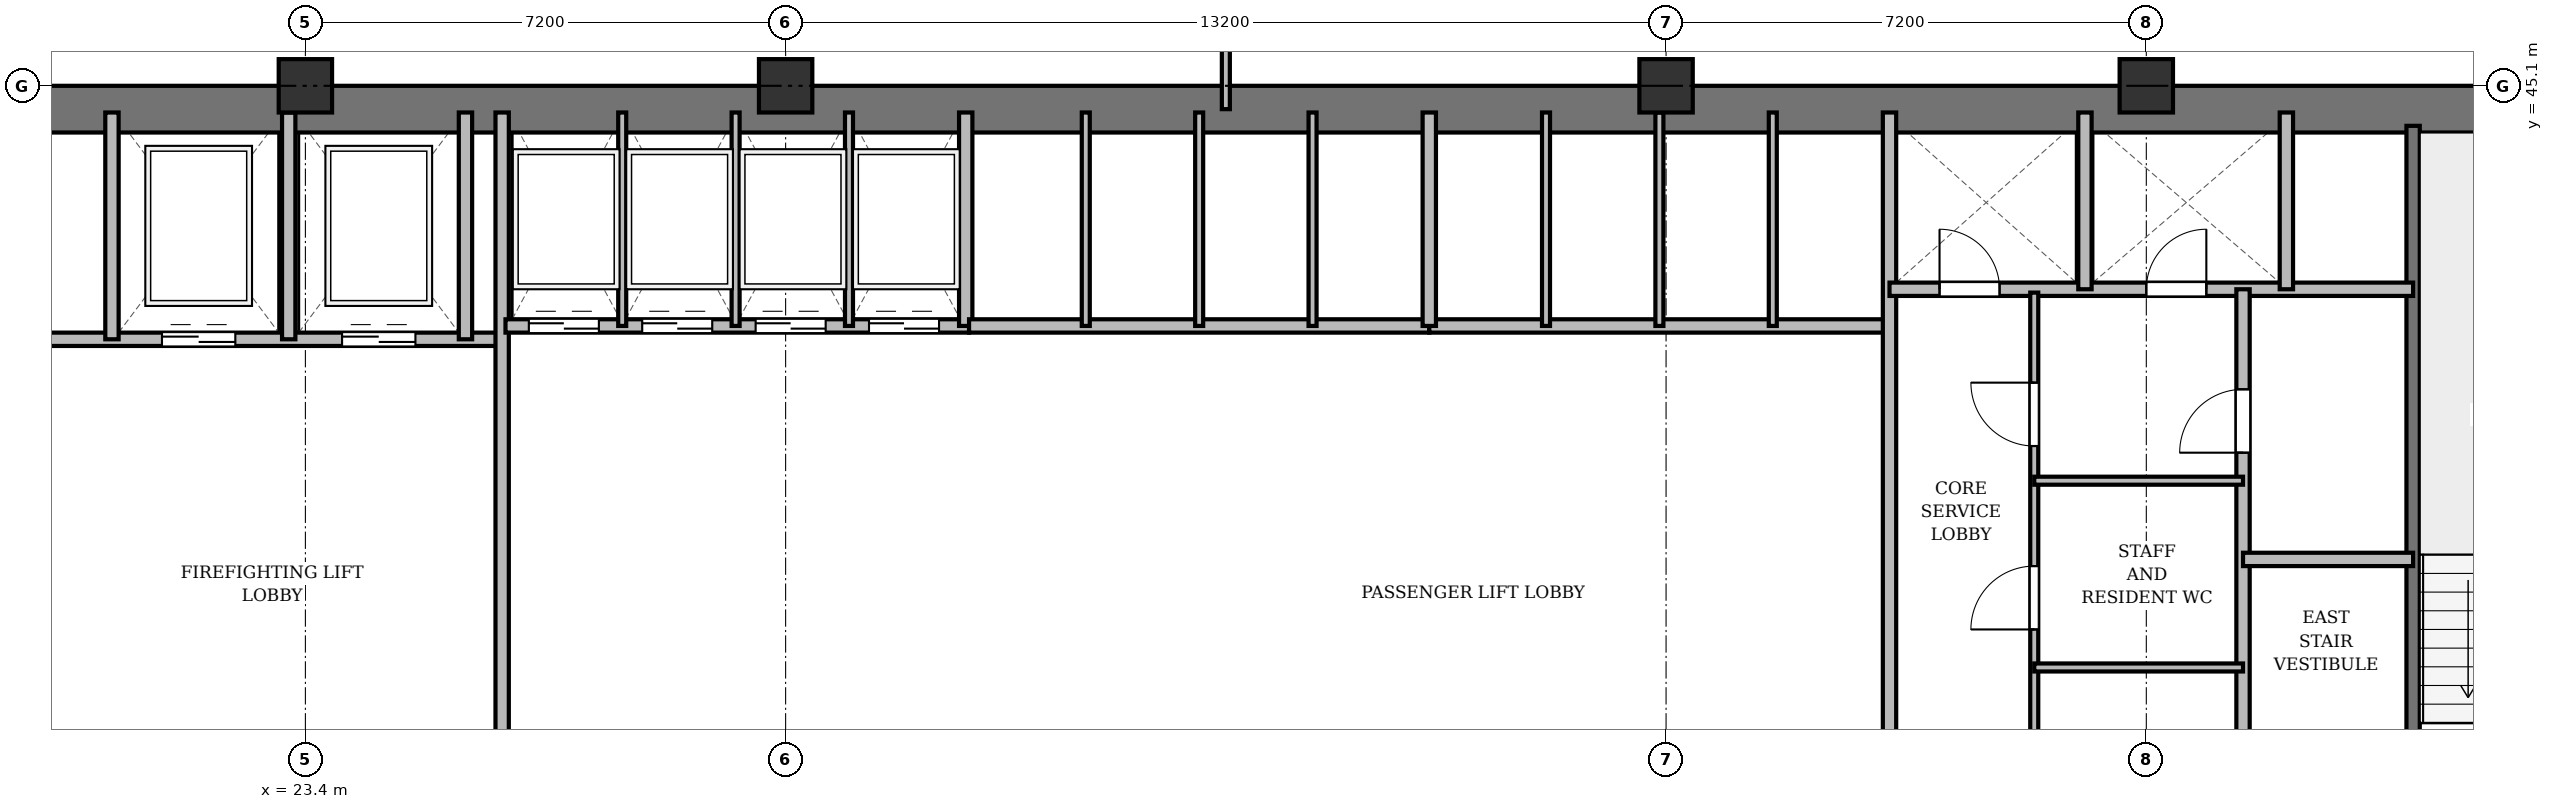
"""IFC4 building model, lengths in metres.
Left out: names, types, materials, properties, quantities, classifications, styles, units other than length and angle.
Written with IfcOpenShell. Run it as: python <this file> out.ifc"""

import sys

from ifc_helpers import new_model, si_unit, direction, frame, frame_2d, origin, origin_2d, place, context, subcontext, project, spatial, rectangle, extrude, source, transform, mapped, element, fill, save


model = new_model("IFC4")
c1 = context("Model", 3, precision=1e-05, world=origin(), true_north=direction((0.0, 1.0)))
c2 = subcontext(c1, "Body", "Model", "MODEL_VIEW")
j1 = project(units=[si_unit("LENGTHUNIT", "METRE"), si_unit("PLANEANGLEUNIT", "RADIAN")], contexts=[c1])
p1 = place(None, origin())
s1 = spatial("IfcSite", under=j1, at=p1, CompositionType="ELEMENT")
p2 = place(p1, origin())
s2 = spatial("IfcBuilding", under=s1, at=p2, CompositionType="ELEMENT")
p3 = place(p2, frame((0.0, 0.0, 96.1)))
s3 = spatial("IfcBuildingStorey", under=s2, at=p3, CompositionType="ELEMENT", Elevation=96.1)
m1 = source(origin(), c2, "Body", "SweptSolid", [
    extrude(rectangle(XDim=0.8, YDim=0.8, at=origin_2d()), origin(), (0.0, 0.0, 1.0), 3.6),
])
for number, where, z_axis, x_axis in (
    (1, (23.4, 45.1, 0.0), (0.0, 0.0, 1.0), (1.0, 0.0, 0.0)),
    (2, (30.6, 45.1, 0.0), (0.0, 0.0, 1.0), (1.0, 0.0, 0.0)),
    (3, (43.8, 45.1, 0.0), (0.0, 0.0, 1.0), (1.0, 0.0, 0.0)),
    (4, (51.0, 45.1, 0.0), (0.0, 0.0, 1.0), (1.0, 0.0, 0.0)),
):
    element("IfcColumn", number, at=place(p3, frame(where, z_axis=z_axis, x_axis=x_axis)), inside=s3, PredefinedType="COLUMN", context=c2, shape_type="MappedRepresentation", body=[
        mapped(m1, transform((0.0, 0.0, 0.0), x_axis=(1.0, 0.0, 0.0), y_axis=(0.0, 1.0, 0.0), z_axis=(0.0, 0.0, 1.0), scale=1.0)),
    ])
p4 = place(p3, frame((15.5, 44.75, 0.0), z_axis=(0.0, 0.0, 1.0), x_axis=(1.0, 0.0, 0.0)))
e5 = element("IfcWall", 5, at=p4, inside=s3, PredefinedType="SHEAR", context=c2, shape_type="SweptSolid", body=[
    extrude(rectangle(XDim=43.4, YDim=0.7, at=frame_2d((21.7, 0.0))), origin(), (0.0, 0.0, 1.0), 3.34),
])
p5 = place(p3, frame((55.0, 33.4, 0.0), z_axis=(0.0, 0.0, 1.0), x_axis=(0.0, 1.0, 0.0)))
e6 = element("IfcWall", 6, at=p5, inside=s3, PredefinedType="SHEAR", context=c2, shape_type="SweptSolid", body=[
    extrude(rectangle(XDim=11.1, YDim=0.2, at=frame_2d((5.55, 0.0))), origin(), (0.0, 0.0, 1.0), 3.34),
])
p6 = place(p5, frame((0.85, 0.0, 0.0)))
e7 = element("IfcOpeningElement", 7, at=p6, cuts=e6, PredefinedType="OPENING", context=c2, shape_type="SweptSolid", body=[
    extrude(rectangle(XDim=1.1, YDim=2.15, at=frame_2d((0.55, 1.075))), frame((0.0, 0.11, 0.0), z_axis=(0.0, -1.0, 0.0), x_axis=(1.0, 0.0, 0.0)), (0.0, 0.0, 1.0), 0.22),
])
p7 = place(p3, frame((19.55, 41.3, 0.0), z_axis=(0.0, 0.0, 1.0), x_axis=(1.0, 0.0, 0.0)))
e8 = element("IfcWall", 8, at=p7, inside=s3, PredefinedType="SOLIDWALL", context=c2, shape_type="SweptSolid", body=[
    extrude(rectangle(XDim=6.75, YDim=0.2, at=frame_2d((3.375, 0.0))), origin(), (0.0, 0.0, 1.0), 3.34),
])
p8 = place(p7, frame((1.7, 0.0, 0.0)))
e9 = element("IfcOpeningElement", 9, at=p8, cuts=e8, PredefinedType="OPENING", context=c2, shape_type="SweptSolid", body=[
    extrude(rectangle(XDim=1.1, YDim=2.15, at=frame_2d((0.55, 1.075))), frame((0.0, 0.11, 0.0), z_axis=(0.0, -1.0, 0.0), x_axis=(1.0, 0.0, 0.0)), (0.0, 0.0, 1.0), 0.22),
])
p9 = place(p7, frame((4.4, 0.0, 0.0)))
e10 = element("IfcOpeningElement", 10, at=p9, cuts=e8, PredefinedType="OPENING", context=c2, shape_type="SweptSolid", body=[
    extrude(rectangle(XDim=1.1, YDim=2.15, at=frame_2d((0.55, 1.075))), frame((0.0, 0.11, 0.0), z_axis=(0.0, -1.0, 0.0), x_axis=(1.0, 0.0, 0.0)), (0.0, 0.0, 1.0), 0.22),
])
for number, where, z_axis, x_axis in (
    (11, (20.5, 41.3, 0.0), (0.0, 0.0, 1.0), (0.0, 1.0, 0.0)),
    (12, (23.15, 41.3, 0.0), (0.0, 0.0, 1.0), (0.0, 1.0, 0.0)),
    (13, (25.8, 41.3, 0.0), (0.0, 0.0, 1.0), (0.0, 1.0, 0.0)),
):
    element("IfcWall", number, at=place(p3, frame(where, z_axis=z_axis, x_axis=x_axis)), inside=s3, PredefinedType="SOLIDWALL", context=c2, shape_type="SweptSolid", body=[
        extrude(rectangle(XDim=3.4, YDim=0.2, at=frame_2d((1.7, 0.0))), origin(), (0.0, 0.0, 1.0), 3.34),
    ])
p10 = place(p3, frame((26.35, 33.4, 0.0), z_axis=(0.0, 0.0, 1.0), x_axis=(0.0, 1.0, 0.0)))
e14 = element("IfcWall", 14, at=p10, inside=s3, PredefinedType="SOLIDWALL", context=c2, shape_type="SweptSolid", body=[
    extrude(rectangle(XDim=11.3, YDim=0.2, at=frame_2d((5.65, 0.0))), origin(), (0.0, 0.0, 1.0), 2.752),
])
p11 = place(p3, frame((26.4, 41.5, 0.0), z_axis=(0.0, 0.0, 1.0), x_axis=(1.0, 0.0, 0.0)))
e15 = element("IfcWall", 15, at=p11, inside=s3, PredefinedType="SOLIDWALL", context=c2, shape_type="SweptSolid", body=[
    extrude(rectangle(XDim=6.95, YDim=0.2, at=frame_2d((3.475, 0.0))), origin(), (0.0, 0.0, 1.0), 3.34),
])
p12 = place(p11, frame((0.35, 0.0, 0.0)))
e16 = element("IfcOpeningElement", 16, at=p12, cuts=e15, PredefinedType="OPENING", context=c2, shape_type="SweptSolid", body=[
    extrude(rectangle(XDim=1.05, YDim=2.15, at=frame_2d((0.525, 1.075))), frame((0.0, 0.11, 0.0), z_axis=(0.0, -1.0, 0.0), x_axis=(1.0, 0.0, 0.0)), (0.0, 0.0, 1.0), 0.22),
])
p13 = place(p11, frame((2.05, 0.0, 0.0)))
e17 = element("IfcOpeningElement", 17, at=p13, cuts=e15, PredefinedType="OPENING", context=c2, shape_type="SweptSolid", body=[
    extrude(rectangle(XDim=1.05, YDim=2.15, at=frame_2d((0.525, 1.075))), frame((0.0, 0.11, 0.0), z_axis=(0.0, -1.0, 0.0), x_axis=(1.0, 0.0, 0.0)), (0.0, 0.0, 1.0), 0.22),
])
p14 = place(p11, frame((3.75, 0.0, 0.0)))
e18 = element("IfcOpeningElement", 18, at=p14, cuts=e15, PredefinedType="OPENING", context=c2, shape_type="SweptSolid", body=[
    extrude(rectangle(XDim=1.05, YDim=2.15, at=frame_2d((0.525, 1.075))), frame((0.0, 0.11, 0.0), z_axis=(0.0, -1.0, 0.0), x_axis=(1.0, 0.0, 0.0)), (0.0, 0.0, 1.0), 0.22),
])
p15 = place(p11, frame((5.45, 0.0, 0.0)))
e19 = element("IfcOpeningElement", 19, at=p15, cuts=e15, PredefinedType="OPENING", context=c2, shape_type="SweptSolid", body=[
    extrude(rectangle(XDim=1.05, YDim=2.15, at=frame_2d((0.525, 1.075))), frame((0.0, 0.11, 0.0), z_axis=(0.0, -1.0, 0.0), x_axis=(1.0, 0.0, 0.0)), (0.0, 0.0, 1.0), 0.22),
])
p16 = place(p3, frame((33.3, 41.5, 0.0), z_axis=(0.0, 0.0, 1.0), x_axis=(0.0, 1.0, 0.0)))
e20 = element("IfcWall", 20, at=p16, inside=s3, PredefinedType="SOLIDWALL", context=c2, shape_type="SweptSolid", body=[
    extrude(rectangle(XDim=3.2, YDim=0.2, at=frame_2d((1.6, 0.0))), origin(), (0.0, 0.0, 1.0), 3.34),
])
for number, where, z_axis, x_axis in (
    (21, (28.15, 41.5, 0.0), (0.0, 0.0, 1.0), (0.0, 1.0, 0.0)),
    (22, (29.85, 41.5, 0.0), (0.0, 0.0, 1.0), (0.0, 1.0, 0.0)),
    (23, (31.55, 41.5, 0.0), (0.0, 0.0, 1.0), (0.0, 1.0, 0.0)),
):
    element("IfcWall", number, at=place(p3, frame(where, z_axis=z_axis, x_axis=x_axis)), inside=s3, PredefinedType="PARTITIONING", context=c2, shape_type="SweptSolid", body=[
        extrude(rectangle(XDim=3.2, YDim=0.12, at=frame_2d((1.6, 0.0))), origin(), (0.0, 0.0, 1.0), 3.34),
    ])
p17 = place(p3, frame((33.35, 41.5, 0.0), z_axis=(0.0, 0.0, 1.0), x_axis=(1.0, 0.0, 0.0)))
e24 = element("IfcWall", 24, at=p17, inside=s3, PredefinedType="SOLIDWALL", context=c2, shape_type="SweptSolid", body=[
    extrude(rectangle(XDim=6.9, YDim=0.2, at=frame_2d((3.45, 0.0))), origin(), (0.0, 0.0, 1.0), 3.34),
])
for number, where, z_axis, x_axis in (
    (25, (35.1, 41.5, 0.0), (0.0, 0.0, 1.0), (0.0, 1.0, 0.0)),
    (26, (36.8, 41.5, 0.0), (0.0, 0.0, 1.0), (0.0, 1.0, 0.0)),
    (27, (38.5, 41.5, 0.0), (0.0, 0.0, 1.0), (0.0, 1.0, 0.0)),
):
    element("IfcWall", number, at=place(p3, frame(where, z_axis=z_axis, x_axis=x_axis)), inside=s3, PredefinedType="PARTITIONING", context=c2, shape_type="SweptSolid", body=[
        extrude(rectangle(XDim=3.2, YDim=0.12, at=frame_2d((1.6, 0.0))), origin(), (0.0, 0.0, 1.0), 3.34),
    ])
p18 = place(p3, frame((40.25, 41.5, 0.0), z_axis=(0.0, 0.0, 1.0), x_axis=(1.0, 0.0, 0.0)))
e28 = element("IfcWall", 28, at=p18, inside=s3, PredefinedType="SOLIDWALL", context=c2, shape_type="SweptSolid", body=[
    extrude(rectangle(XDim=6.9, YDim=0.2, at=frame_2d((3.45, 0.0))), origin(), (0.0, 0.0, 1.0), 2.84),
])
p19 = place(p3, frame((40.25, 41.5, 0.0), z_axis=(0.0, 0.0, 1.0), x_axis=(0.0, 1.0, 0.0)))
e29 = element("IfcWall", 29, at=p19, inside=s3, PredefinedType="SOLIDWALL", context=c2, shape_type="SweptSolid", body=[
    extrude(rectangle(XDim=3.2, YDim=0.2, at=frame_2d((1.6, 0.0))), origin(), (0.0, 0.0, 1.0), 3.34),
])
p20 = place(p3, frame((42.0, 41.5, 0.0), z_axis=(0.0, 0.0, 1.0), x_axis=(0.0, 1.0, 0.0)))
e30 = element("IfcWall", 30, at=p20, inside=s3, PredefinedType="PARTITIONING", context=c2, shape_type="SweptSolid", body=[
    extrude(rectangle(XDim=3.2, YDim=0.12, at=frame_2d((1.6, 0.0))), origin(), (0.0, 0.0, 1.0), 3.34),
])
p21 = place(p3, frame((43.7, 41.5, 0.0), z_axis=(0.0, 0.0, 1.0), x_axis=(0.0, 1.0, 0.0)))
e31 = element("IfcWall", 31, at=p21, inside=s3, PredefinedType="PARTITIONING", context=c2, shape_type="SweptSolid", body=[
    extrude(rectangle(XDim=3.2, YDim=0.12, at=frame_2d((1.6, 0.0))), origin(), (0.0, 0.0, 1.0), 2.84),
])
p22 = place(p3, frame((45.4, 41.5, 0.0), z_axis=(0.0, 0.0, 1.0), x_axis=(0.0, 1.0, 0.0)))
e32 = element("IfcWall", 32, at=p22, inside=s3, PredefinedType="PARTITIONING", context=c2, shape_type="SweptSolid", body=[
    extrude(rectangle(XDim=3.2, YDim=0.12, at=frame_2d((1.6, 0.0))), origin(), (0.0, 0.0, 1.0), 3.34),
])
p23 = place(p3, frame((47.15, 33.4, 0.0), z_axis=(0.0, 0.0, 1.0), x_axis=(0.0, 1.0, 0.0)))
e33 = element("IfcWall", 33, at=p23, inside=s3, PredefinedType="SOLIDWALL", context=c2, shape_type="SweptSolid", body=[
    extrude(rectangle(XDim=11.3, YDim=0.2, at=frame_2d((5.65, 0.0))), origin(), (0.0, 0.0, 1.0), 2.752),
])
p24 = place(p3, frame((47.15, 42.05, 0.0), z_axis=(0.0, 0.0, 1.0), x_axis=(1.0, 0.0, 0.0)))
e34 = element("IfcWall", 34, at=p24, inside=s3, PredefinedType="SOLIDWALL", context=c2, shape_type="SweptSolid", body=[
    extrude(rectangle(XDim=7.85, YDim=0.2, at=frame_2d((3.925, 0.0))), origin(), (0.0, 0.0, 1.0), 2.84),
])
p25 = place(p24, frame((0.75, 0.0, 0.0)))
e35 = element("IfcOpeningElement", 35, at=p25, cuts=e34, PredefinedType="OPENING", context=c2, shape_type="SweptSolid", body=[
    extrude(rectangle(XDim=0.9, YDim=2.1, at=frame_2d((0.45, 1.05))), frame((0.0, 0.11, 0.0), z_axis=(0.0, -1.0, 0.0), x_axis=(1.0, 0.0, 0.0)), (0.0, 0.0, 1.0), 0.22),
])
p26 = place(p24, frame((3.85, 0.0, 0.0)))
e36 = element("IfcOpeningElement", 36, at=p26, cuts=e34, PredefinedType="OPENING", context=c2, shape_type="SweptSolid", body=[
    extrude(rectangle(XDim=0.9, YDim=2.1, at=frame_2d((0.45, 1.05))), frame((0.0, 0.11, 0.0), z_axis=(0.0, -1.0, 0.0), x_axis=(1.0, 0.0, 0.0)), (0.0, 0.0, 1.0), 0.22),
])
for number, where, z_axis, x_axis in (
    (37, (50.08, 42.05, 0.0), (0.0, 0.0, 1.0), (0.0, 1.0, 0.0)),
    (38, (53.1, 42.05, 0.0), (0.0, 0.0, 1.0), (0.0, 1.0, 0.0)),
):
    element("IfcWall", number, at=place(p3, frame(where, z_axis=z_axis, x_axis=x_axis)), inside=s3, PredefinedType="SOLIDWALL", context=c2, shape_type="SweptSolid", body=[
        extrude(rectangle(XDim=2.65, YDim=0.2, at=frame_2d((1.325, 0.0))), origin(), (0.0, 0.0, 1.0), 3.34),
    ])
p27 = place(p3, frame((52.45, 33.4, 0.0), z_axis=(0.0, 0.0, 1.0), x_axis=(0.0, 1.0, 0.0)))
e39 = element("IfcWall", 39, at=p27, inside=s3, PredefinedType="PARTITIONING", context=c2, shape_type="SweptSolid", body=[
    extrude(rectangle(XDim=8.65, YDim=0.2, at=frame_2d((4.325, 0.0))), origin(), (0.0, 0.0, 1.0), 2.752),
])
p28 = place(p27, frame((6.2, 0.0, 0.0)))
e40 = element("IfcOpeningElement", 40, at=p28, cuts=e39, PredefinedType="OPENING", context=c2, shape_type="SweptSolid", body=[
    extrude(rectangle(XDim=0.95, YDim=2.15, at=frame_2d((0.475, 1.075))), frame((0.0, 0.11, 0.0), z_axis=(0.0, -1.0, 0.0), x_axis=(1.0, 0.0, 0.0)), (0.0, 0.0, 1.0), 0.22),
])
p29 = place(p3, frame((52.45, 38.0, 0.0), z_axis=(0.0, 0.0, 1.0), x_axis=(1.0, 0.0, 0.0)))
e41 = element("IfcWall", 41, at=p29, inside=s3, PredefinedType="PARTITIONING", context=c2, shape_type="SweptSolid", body=[
    extrude(rectangle(XDim=2.55, YDim=0.2, at=frame_2d((1.275, 0.0))), origin(), (0.0, 0.0, 1.0), 3.34),
])
p30 = place(p3, frame((49.32, 33.4, 0.0), z_axis=(0.0, 0.0, 1.0), x_axis=(0.0, 1.0, 0.0)))
e42 = element("IfcWall", 42, at=p30, inside=s3, PredefinedType="PARTITIONING", context=c2, shape_type="SweptSolid", body=[
    extrude(rectangle(XDim=8.6, YDim=0.12, at=frame_2d((4.3, 0.0))), origin(), (0.0, 0.0, 1.0), 2.752),
])
p31 = place(p30, frame((0.85, 0.0, 0.0)))
e43 = element("IfcOpeningElement", 43, at=p31, cuts=e42, PredefinedType="OPENING", context=c2, shape_type="SweptSolid", body=[
    extrude(rectangle(XDim=0.95, YDim=2.15, at=frame_2d((0.475, 1.075))), frame((0.0, 0.07, 0.0), z_axis=(0.0, -1.0, 0.0), x_axis=(1.0, 0.0, 0.0)), (0.0, 0.0, 1.0), 0.14),
])
p32 = place(p30, frame((3.55, 0.0, 0.0)))
e44 = element("IfcOpeningElement", 44, at=p32, cuts=e42, PredefinedType="OPENING", context=c2, shape_type="SweptSolid", body=[
    extrude(rectangle(XDim=0.95, YDim=2.15, at=frame_2d((0.475, 1.075))), frame((0.0, 0.07, 0.0), z_axis=(0.0, -1.0, 0.0), x_axis=(1.0, 0.0, 0.0)), (0.0, 0.0, 1.0), 0.14),
])
p33 = place(p30, frame((6.3, 0.0, 0.0)))
e45 = element("IfcOpeningElement", 45, at=p33, cuts=e42, PredefinedType="OPENING", context=c2, shape_type="SweptSolid", body=[
    extrude(rectangle(XDim=0.95, YDim=2.15, at=frame_2d((0.475, 1.075))), frame((0.0, 0.07, 0.0), z_axis=(0.0, -1.0, 0.0), x_axis=(1.0, 0.0, 0.0)), (0.0, 0.0, 1.0), 0.14),
])
for number, where, z_axis, x_axis in (
    (46, (49.32, 36.38, 0.0), (0.0, 0.0, 1.0), (1.0, 0.0, 0.0)),
    (47, (49.32, 39.18, 0.0), (0.0, 0.0, 1.0), (1.0, 0.0, 0.0)),
):
    element("IfcWall", number, at=place(p3, frame(where, z_axis=z_axis, x_axis=x_axis)), inside=s3, PredefinedType="PARTITIONING", context=c2, shape_type="SweptSolid", body=[
        extrude(rectangle(XDim=3.13, YDim=0.12, at=frame_2d((1.565, 0.0))), origin(), (0.0, 0.0, 1.0), 2.84),
    ])
p34 = place(p3, frame((37.2, 44.75, 0.0), z_axis=(0.0, 0.0, 1.0), x_axis=(0.0, 1.0, 0.0)))
e48 = element("IfcWall", 48, at=p34, inside=s3, PredefinedType="PARTITIONING", context=c2, shape_type="SweptSolid", body=[
    extrude(rectangle(XDim=3.61, YDim=0.12, at=frame_2d((1.805, 0.0))), origin(), (0.0, 0.0, 1.0), 2.752),
])
p35 = place(p34, frame((1.1, 0.0, 0.0)))
e49 = element("IfcOpeningElement", 49, at=p35, cuts=e48, PredefinedType="OPENING", context=c2, shape_type="SweptSolid", body=[
    extrude(rectangle(XDim=0.95, YDim=2.15, at=frame_2d((0.475, 1.075))), frame((0.0, 0.07, 0.0), z_axis=(0.0, -1.0, 0.0), x_axis=(1.0, 0.0, 0.0)), (0.0, 0.0, 1.0), 0.14),
])
m2 = source(origin(), c2, "Body", "SweptSolid", [
    extrude(rectangle(XDim=1.1, YDim=2.15, at=frame_2d((0.55, 1.075))), frame((0.0, 0.025, 0.0), z_axis=(0.0, -1.0, 0.0), x_axis=(1.0, 0.0, 0.0)), (0.0, 0.0, 1.0), 0.05),
])
p36 = place(p8, origin())
e50 = element("IfcDoor", 50, at=p36, inside=s3, OperationType="DOUBLE_DOOR_SLIDING", PredefinedType="DOOR", context=c2, shape_type="MappedRepresentation", body=[
    mapped(m2, transform((0.0, 0.0, 0.0), x_axis=(1.0, 0.0, 0.0), y_axis=(0.0, 1.0, 0.0), z_axis=(0.0, 0.0, 1.0), scale=1.0)),
])
fill(e9, e50)
p37 = place(p9, origin())
e51 = element("IfcDoor", 51, at=p37, inside=s3, OperationType="DOUBLE_DOOR_SLIDING", PredefinedType="DOOR", context=c2, shape_type="MappedRepresentation", body=[
    mapped(m2, transform((0.0, 0.0, 0.0), x_axis=(1.0, 0.0, 0.0), y_axis=(0.0, 1.0, 0.0), z_axis=(0.0, 0.0, 1.0), scale=1.0)),
])
fill(e10, e51)
m3 = source(origin(), c2, "Body", "SweptSolid", [
    extrude(rectangle(XDim=1.05, YDim=2.15, at=frame_2d((0.525, 1.075))), frame((0.0, 0.025, 0.0), z_axis=(0.0, -1.0, 0.0), x_axis=(1.0, 0.0, 0.0)), (0.0, 0.0, 1.0), 0.05),
])
p38 = place(p12, origin())
e52 = element("IfcDoor", 52, at=p38, inside=s3, OperationType="DOUBLE_DOOR_SLIDING", PredefinedType="DOOR", context=c2, shape_type="MappedRepresentation", body=[
    mapped(m3, transform((0.0, 0.0, 0.0), x_axis=(1.0, 0.0, 0.0), y_axis=(0.0, 1.0, 0.0), z_axis=(0.0, 0.0, 1.0), scale=1.0)),
])
fill(e16, e52)
p39 = place(p13, origin())
e53 = element("IfcDoor", 53, at=p39, inside=s3, OperationType="DOUBLE_DOOR_SLIDING", PredefinedType="DOOR", context=c2, shape_type="MappedRepresentation", body=[
    mapped(m3, transform((0.0, 0.0, 0.0), x_axis=(1.0, 0.0, 0.0), y_axis=(0.0, 1.0, 0.0), z_axis=(0.0, 0.0, 1.0), scale=1.0)),
])
fill(e17, e53)
p40 = place(p14, origin())
e54 = element("IfcDoor", 54, at=p40, inside=s3, OperationType="DOUBLE_DOOR_SLIDING", PredefinedType="DOOR", context=c2, shape_type="MappedRepresentation", body=[
    mapped(m3, transform((0.0, 0.0, 0.0), x_axis=(1.0, 0.0, 0.0), y_axis=(0.0, 1.0, 0.0), z_axis=(0.0, 0.0, 1.0), scale=1.0)),
])
fill(e18, e54)
p41 = place(p15, origin())
e55 = element("IfcDoor", 55, at=p41, inside=s3, OperationType="DOUBLE_DOOR_SLIDING", PredefinedType="DOOR", context=c2, shape_type="MappedRepresentation", body=[
    mapped(m3, transform((0.0, 0.0, 0.0), x_axis=(1.0, 0.0, 0.0), y_axis=(0.0, 1.0, 0.0), z_axis=(0.0, 0.0, 1.0), scale=1.0)),
])
fill(e19, e55)
m4 = source(origin(), c2, "Body", "SweptSolid", [
    extrude(rectangle(XDim=0.9, YDim=2.1, at=frame_2d((0.45, 1.05))), frame((0.0, 0.025, 0.0), z_axis=(0.0, -1.0, 0.0), x_axis=(1.0, 0.0, 0.0)), (0.0, 0.0, 1.0), 0.05),
])
p42 = place(p25, origin())
e56 = element("IfcDoor", 56, at=p42, inside=s3, OperationType="SINGLE_SWING_LEFT", PredefinedType="DOOR", context=c2, shape_type="MappedRepresentation", body=[
    mapped(m4, transform((0.0, 0.0, 0.0), x_axis=(1.0, 0.0, 0.0), y_axis=(0.0, 1.0, 0.0), z_axis=(0.0, 0.0, 1.0), scale=1.0)),
])
fill(e35, e56)
p43 = place(p26, origin())
e57 = element("IfcDoor", 57, at=p43, inside=s3, OperationType="SINGLE_SWING_RIGHT", PredefinedType="DOOR", context=c2, shape_type="MappedRepresentation", body=[
    mapped(m4, transform((0.0, 0.0, 0.0), x_axis=(1.0, 0.0, 0.0), y_axis=(0.0, 1.0, 0.0), z_axis=(0.0, 0.0, 1.0), scale=1.0)),
])
fill(e36, e57)
m5 = source(origin(), c2, "Body", "SweptSolid", [
    extrude(rectangle(XDim=0.95, YDim=2.15, at=frame_2d((0.475, 1.075))), frame((0.0, 0.025, 0.0), z_axis=(0.0, -1.0, 0.0), x_axis=(1.0, 0.0, 0.0)), (0.0, 0.0, 1.0), 0.05),
])
p44 = place(p28, origin())
e58 = element("IfcDoor", 58, at=p44, inside=s3, OperationType="SINGLE_SWING_LEFT", PredefinedType="DOOR", context=c2, shape_type="MappedRepresentation", body=[
    mapped(m5, transform((0.0, 0.0, 0.0), x_axis=(1.0, 0.0, 0.0), y_axis=(0.0, 1.0, 0.0), z_axis=(0.0, 0.0, 1.0), scale=1.0)),
])
fill(e40, e58)
p45 = place(p32, origin())
e59 = element("IfcDoor", 59, at=p45, inside=s3, OperationType="SINGLE_SWING_LEFT", PredefinedType="DOOR", context=c2, shape_type="MappedRepresentation", body=[
    mapped(m5, transform((0.0, 0.0, 0.0), x_axis=(1.0, 0.0, 0.0), y_axis=(0.0, 1.0, 0.0), z_axis=(0.0, 0.0, 1.0), scale=1.0)),
])
fill(e44, e59)
p46 = place(p33, origin())
e60 = element("IfcDoor", 60, at=p46, inside=s3, OperationType="SINGLE_SWING_RIGHT", PredefinedType="DOOR", context=c2, shape_type="MappedRepresentation", body=[
    mapped(m5, transform((0.0, 0.0, 0.0), x_axis=(1.0, 0.0, 0.0), y_axis=(0.0, 1.0, 0.0), z_axis=(0.0, 0.0, 1.0), scale=1.0)),
])
fill(e45, e60)
save(model, sys.argv[1])
